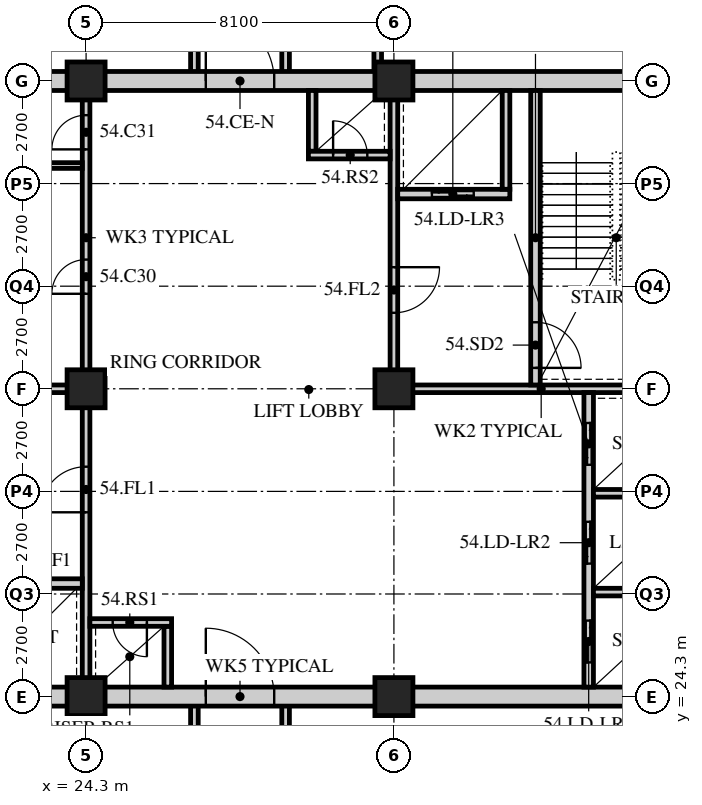
"""IFC4 building model, lengths in metres.
Left out: names, types, materials, properties, quantities, classifications, styles, units other than length and angle.
Written with IfcOpenShell. Run it as: python <this file> out.ifc"""

import sys

from ifc_helpers import new_model, si_unit, direction, frame, frame_2d, origin, origin_2d, place, context, subcontext, project, spatial, rectangle, hollow_rectangle, extrude, element, fill, save


model = new_model("IFC4")
c1 = context("Model", 3, precision=1e-05, world=origin(), true_north=direction((0.0, 1.0)))
c2 = subcontext(c1, "Body", "Model", "MODEL_VIEW")
j1 = project(units=[si_unit("LENGTHUNIT", "METRE"), si_unit("PLANEANGLEUNIT", "RADIAN")], contexts=[c1])
p1 = place(None, origin())
s1 = spatial("IfcSite", under=j1, at=p1, CompositionType="ELEMENT")
p2 = place(p1, origin())
s2 = spatial("IfcBuilding", under=s1, at=p2, CompositionType="ELEMENT")
p3 = place(p2, frame((0.0, 0.0, 210.0)))
s3 = spatial("IfcBuildingStorey", under=s2, at=p3, CompositionType="ELEMENT", Elevation=210.0)
for number, where, z_axis, x_axis in (
    (1, (24.3, 24.3, 0.0), (0.0, 0.0, 1.0), (1.0, 0.0, 0.0)),
    (2, (24.3, 32.4, 0.0), (0.0, 0.0, 1.0), (1.0, 0.0, 0.0)),
    (3, (24.3, 40.5, 0.0), (0.0, 0.0, 1.0), (1.0, 0.0, 0.0)),
    (4, (32.4, 24.3, 0.0), (0.0, 0.0, 1.0), (1.0, 0.0, 0.0)),
    (5, (32.4, 32.4, 0.0), (0.0, 0.0, 1.0), (1.0, 0.0, 0.0)),
    (6, (32.4, 40.5, 0.0), (0.0, 0.0, 1.0), (1.0, 0.0, 0.0)),
):
    element("IfcColumn", number, at=place(p3, frame(where, z_axis=z_axis, x_axis=x_axis)), inside=s3, PredefinedType="COLUMN", context=c2, shape_type="SweptSolid", body=[
        extrude(hollow_rectangle(XDim=1.0, YDim=1.0, WallThickness=0.1, at=origin_2d()), origin(), (0.0, 0.0, 1.0), 3.6),
    ])
for number, where, z_axis, x_axis in (
    (7, (27.15, 20.7, 0.0), (0.0, 0.0, 1.0), (0.0, 1.0, 0.0)),
    (8, (29.55, 20.7, 0.0), (0.0, 0.0, 1.0), (0.0, 1.0, 0.0)),
):
    element("IfcWall", number, at=place(p3, frame(where, z_axis=z_axis, x_axis=x_axis)), inside=s3, PredefinedType="SOLIDWALL", context=c2, shape_type="SweptSolid", body=[
        extrude(rectangle(XDim=3.6, YDim=0.2, at=frame_2d((1.8, 0.0))), origin(), (0.0, 0.0, 1.0), 3.39),
    ])
p4 = place(p3, frame((31.974, 45.45, 0.0), z_axis=(0.0, 0.0, 1.0), x_axis=(0.0, -1.0, 0.0)))
e9 = element("IfcWall", 9, at=p4, inside=s3, PredefinedType="SOLIDWALL", context=c2, shape_type="SweptSolid", body=[
    extrude(rectangle(XDim=4.95, YDim=0.2, at=frame_2d((2.475, 0.0))), origin(), (0.0, 0.0, 1.0), 2.69),
])
for number, where, z_axis, x_axis in (
    (10, (27.15, 40.5, 0.0), (0.0, 0.0, 1.0), (0.0, 1.0, 0.0)),
    (11, (29.55, 40.5, 0.0), (0.0, 0.0, 1.0), (0.0, 1.0, 0.0)),
):
    element("IfcWall", number, at=place(p3, frame(where, z_axis=z_axis, x_axis=x_axis)), inside=s3, PredefinedType="SOLIDWALL", context=c2, shape_type="SweptSolid", body=[
        extrude(rectangle(XDim=4.95, YDim=0.2, at=frame_2d((2.475, 0.0))), origin(), (0.0, 0.0, 1.0), 3.39),
    ])
p5 = place(p3, frame((15.95, 24.3, 0.0), z_axis=(0.0, 0.0, 1.0), x_axis=(1.0, 0.0, 0.0)))
e12 = element("IfcWall", 12, at=p5, inside=s3, PredefinedType="SOLIDWALL", context=c2, shape_type="SweptSolid", body=[
    extrude(rectangle(XDim=24.8, YDim=0.5, at=frame_2d((12.4, 0.0))), origin(), (0.0, 0.0, 1.0), 2.74),
])
p6 = place(p5, frame((11.5, 0.0, 0.0)))
e13 = element("IfcOpeningElement", 13, at=p6, cuts=e12, PredefinedType="OPENING", context=c2, shape_type="SweptSolid", body=[
    extrude(rectangle(XDim=1.8, YDim=2.4, at=frame_2d((0.9, 1.2))), frame((0.0, 0.26, 0.0), z_axis=(0.0, -1.0, 0.0), x_axis=(1.0, 0.0, 0.0)), (0.0, 0.0, 1.0), 0.52),
])
p7 = place(p3, frame((15.95, 40.5, 0.0), z_axis=(0.0, 0.0, 1.0), x_axis=(1.0, 0.0, 0.0)))
e14 = element("IfcWall", 14, at=p7, inside=s3, PredefinedType="SOLIDWALL", context=c2, shape_type="SweptSolid", body=[
    extrude(rectangle(XDim=24.8, YDim=0.5, at=frame_2d((12.4, 0.0))), origin(), (0.0, 0.0, 1.0), 2.74),
])
p8 = place(p7, frame((11.5, 0.0, 0.0)))
e15 = element("IfcOpeningElement", 15, at=p8, cuts=e14, PredefinedType="OPENING", context=c2, shape_type="SweptSolid", body=[
    extrude(rectangle(XDim=1.8, YDim=2.4, at=frame_2d((0.9, 1.2))), frame((0.0, 0.26, 0.0), z_axis=(0.0, -1.0, 0.0), x_axis=(1.0, 0.0, 0.0)), (0.0, 0.0, 1.0), 0.52),
])
p9 = place(p3, frame((16.45, 32.4, 0.0), z_axis=(0.0, 0.0, 1.0), x_axis=(1.0, 0.0, 0.0)))
e16 = element("IfcWall", 16, at=p9, inside=s3, PredefinedType="SOLIDWALL", context=c2, shape_type="SweptSolid", body=[
    extrude(rectangle(XDim=7.95, YDim=0.2, at=frame_2d((3.975, 0.0))), origin(), (0.0, 0.0, 1.0), 2.778),
])
p10 = place(p3, frame((24.3, 24.55, 0.0), z_axis=(0.0, 0.0, 1.0), x_axis=(0.0, 1.0, 0.0)))
e17 = element("IfcWall", 17, at=p10, inside=s3, PredefinedType="SOLIDWALL", context=c2, shape_type="SweptSolid", body=[
    extrude(rectangle(XDim=7.75, YDim=0.2, at=frame_2d((3.875, 0.0))), origin(), (0.0, 0.0, 1.0), 2.778),
])
p11 = place(p10, frame((4.6, 0.0, 0.0)))
e18 = element("IfcOpeningElement", 18, at=p11, cuts=e17, PredefinedType="OPENING", context=c2, shape_type="SweptSolid", body=[
    extrude(rectangle(XDim=1.2, YDim=2.1, at=frame_2d((0.6, 1.05))), frame((0.0, 0.11, 0.0), z_axis=(0.0, -1.0, 0.0), x_axis=(1.0, 0.0, 0.0)), (0.0, 0.0, 1.0), 0.22),
])
p12 = place(p3, frame((21.25, 27.275, 0.0), z_axis=(0.0, 0.0, 1.0), x_axis=(1.0, 0.0, 0.0)))
e19 = element("IfcWall", 19, at=p12, inside=s3, PredefinedType="SOLIDWALL", context=c2, shape_type="SweptSolid", body=[
    extrude(rectangle(XDim=2.95, YDim=0.25, at=frame_2d((1.475, 0.0))), origin(), (0.0, 0.0, 1.0), 3.39),
])
p13 = place(p12, frame((0.95, 0.0, 0.0)))
e20 = element("IfcOpeningElement", 20, at=p13, cuts=e19, PredefinedType="OPENING", context=c2, shape_type="SweptSolid", body=[
    extrude(rectangle(XDim=1.1, YDim=2.4, at=frame_2d((0.55, 1.2))), frame((0.0, 0.135, 0.0), z_axis=(0.0, -1.0, 0.0), x_axis=(1.0, 0.0, 0.0)), (0.0, 0.0, 1.0), 0.27),
])
p14 = place(p3, frame((26.45, 24.55, 0.0), z_axis=(0.0, 0.0, 1.0), x_axis=(0.0, 1.0, 0.0)))
e21 = element("IfcWall", 21, at=p14, inside=s3, PredefinedType="SOLIDWALL", context=c2, shape_type="SweptSolid", body=[
    extrude(rectangle(XDim=1.6, YDim=0.2, at=frame_2d((0.8, 0.0))), origin(), (0.0, 0.0, 1.0), 3.39),
])
p15 = place(p3, frame((24.4, 26.25, 0.0), z_axis=(0.0, 0.0, 1.0), x_axis=(1.0, 0.0, 0.0)))
e22 = element("IfcWall", 22, at=p15, inside=s3, PredefinedType="SOLIDWALL", context=c2, shape_type="SweptSolid", body=[
    extrude(rectangle(XDim=2.15, YDim=0.2, at=frame_2d((1.075, 0.0))), origin(), (0.0, 0.0, 1.0), 3.39),
])
p16 = place(p15, frame((0.6, 0.0, 0.0)))
e23 = element("IfcOpeningElement", 23, at=p16, cuts=e22, PredefinedType="OPENING", context=c2, shape_type="SweptSolid", body=[
    extrude(rectangle(XDim=0.9, YDim=2.1, at=frame_2d((0.45, 1.05))), frame((0.0, 0.11, 0.0), z_axis=(0.0, -1.0, 0.0), x_axis=(1.0, 0.0, 0.0)), (0.0, 0.0, 1.0), 0.22),
])
p17 = place(p3, frame((32.3, 32.4, 0.0), z_axis=(0.0, 0.0, 1.0), x_axis=(1.0, 0.0, 0.0)))
e24 = element("IfcWall", 24, at=p17, inside=s3, PredefinedType="SOLIDWALL", context=c2, shape_type="SweptSolid", body=[
    extrude(rectangle(XDim=7.95, YDim=0.2, at=frame_2d((3.975, 0.0))), origin(), (0.0, 0.0, 1.0), 2.778),
])
p18 = place(p3, frame((32.4, 32.5, 0.0), z_axis=(0.0, 0.0, 1.0), x_axis=(0.0, 1.0, 0.0)))
e25 = element("IfcWall", 25, at=p18, inside=s3, PredefinedType="SOLIDWALL", context=c2, shape_type="SweptSolid", body=[
    extrude(rectangle(XDim=7.75, YDim=0.2, at=frame_2d((3.875, 0.0))), origin(), (0.0, 0.0, 1.0), 2.778),
])
p19 = place(p18, frame((1.9, 0.0, 0.0)))
e26 = element("IfcOpeningElement", 26, at=p19, cuts=e25, PredefinedType="OPENING", context=c2, shape_type="SweptSolid", body=[
    extrude(rectangle(XDim=1.2, YDim=2.1, at=frame_2d((0.6, 1.05))), frame((0.0, 0.11, 0.0), z_axis=(0.0, -1.0, 0.0), x_axis=(1.0, 0.0, 0.0)), (0.0, 0.0, 1.0), 0.22),
])
p20 = place(p3, frame((37.525, 24.55, 0.0), z_axis=(0.0, 0.0, 1.0), x_axis=(0.0, 1.0, 0.0)))
e27 = element("IfcWall", 27, at=p20, inside=s3, PredefinedType="SOLIDWALL", context=c2, shape_type="SweptSolid", body=[
    extrude(rectangle(XDim=7.75, YDim=0.25, at=frame_2d((3.875, 0.0))), origin(), (0.0, 0.0, 1.0), 3.39),
])
p21 = place(p20, frame((0.65, 0.0, 0.0)))
e28 = element("IfcOpeningElement", 28, at=p21, cuts=e27, PredefinedType="OPENING", context=c2, shape_type="SweptSolid", body=[
    extrude(rectangle(XDim=1.1, YDim=2.4, at=frame_2d((0.55, 1.2))), frame((0.0, 0.135, 0.0), z_axis=(0.0, -1.0, 0.0), x_axis=(1.0, 0.0, 0.0)), (0.0, 0.0, 1.0), 0.27),
])
p22 = place(p20, frame((3.25, 0.0, 0.0)))
e29 = element("IfcOpeningElement", 29, at=p22, cuts=e27, PredefinedType="OPENING", context=c2, shape_type="SweptSolid", body=[
    extrude(rectangle(XDim=1.1, YDim=2.4, at=frame_2d((0.55, 1.2))), frame((0.0, 0.135, 0.0), z_axis=(0.0, -1.0, 0.0), x_axis=(1.0, 0.0, 0.0)), (0.0, 0.0, 1.0), 0.27),
])
p23 = place(p20, frame((5.85, 0.0, 0.0)))
e30 = element("IfcOpeningElement", 30, at=p23, cuts=e27, PredefinedType="OPENING", context=c2, shape_type="SweptSolid", body=[
    extrude(rectangle(XDim=1.1, YDim=2.4, at=frame_2d((0.55, 1.2))), frame((0.0, 0.135, 0.0), z_axis=(0.0, -1.0, 0.0), x_axis=(1.0, 0.0, 0.0)), (0.0, 0.0, 1.0), 0.27),
])
for number, where, z_axis, x_axis in (
    (31, (37.65, 27.05, 0.0), (0.0, 0.0, 1.0), (1.0, 0.0, 0.0)),
    (32, (37.65, 29.65, 0.0), (0.0, 0.0, 1.0), (1.0, 0.0, 0.0)),
):
    element("IfcWall", number, at=place(p3, frame(where, z_axis=z_axis, x_axis=x_axis)), inside=s3, PredefinedType="SOLIDWALL", context=c2, shape_type="SweptSolid", body=[
        extrude(rectangle(XDim=2.6, YDim=0.2, at=frame_2d((1.3, 0.0))), origin(), (0.0, 0.0, 1.0), 3.39),
    ])
p24 = place(p3, frame((36.125, 32.5, 0.0), z_axis=(0.0, 0.0, 1.0), x_axis=(0.0, 1.0, 0.0)))
e33 = element("IfcWall", 33, at=p24, inside=s3, PredefinedType="SOLIDWALL", context=c2, shape_type="SweptSolid", body=[
    extrude(rectangle(XDim=7.75, YDim=0.25, at=frame_2d((3.875, 0.0))), origin(), (0.0, 0.0, 1.0), 3.39),
])
p25 = place(p24, frame((0.45, 0.0, 0.0)))
e34 = element("IfcOpeningElement", 34, at=p25, cuts=e33, PredefinedType="OPENING", context=c2, shape_type="SweptSolid", body=[
    extrude(rectangle(XDim=1.2, YDim=2.1, at=frame_2d((0.6, 1.05))), frame((0.0, 0.135, 0.0), z_axis=(0.0, -1.0, 0.0), x_axis=(1.0, 0.0, 0.0)), (0.0, 0.0, 1.0), 0.27),
])
p26 = place(p3, frame((32.5, 37.525, 0.0), z_axis=(0.0, 0.0, 1.0), x_axis=(1.0, 0.0, 0.0)))
e35 = element("IfcWall", 35, at=p26, inside=s3, PredefinedType="SOLIDWALL", context=c2, shape_type="SweptSolid", body=[
    extrude(rectangle(XDim=2.95, YDim=0.25, at=frame_2d((1.475, 0.0))), origin(), (0.0, 0.0, 1.0), 3.39),
])
p27 = place(p26, frame((0.9, 0.0, 0.0)))
e36 = element("IfcOpeningElement", 36, at=p27, cuts=e35, PredefinedType="OPENING", context=c2, shape_type="SweptSolid", body=[
    extrude(rectangle(XDim=1.1, YDim=2.4, at=frame_2d((0.55, 1.2))), frame((0.0, 0.135, 0.0), z_axis=(0.0, -1.0, 0.0), x_axis=(1.0, 0.0, 0.0)), (0.0, 0.0, 1.0), 0.27),
])
p28 = place(p3, frame((35.35, 37.65, 0.0), z_axis=(0.0, 0.0, 1.0), x_axis=(0.0, 1.0, 0.0)))
e37 = element("IfcWall", 37, at=p28, inside=s3, PredefinedType="SOLIDWALL", context=c2, shape_type="SweptSolid", body=[
    extrude(rectangle(XDim=2.6, YDim=0.2, at=frame_2d((1.3, 0.0))), origin(), (0.0, 0.0, 1.0), 3.39),
])
p29 = place(p3, frame((30.25, 38.65, 0.0), z_axis=(0.0, 0.0, 1.0), x_axis=(0.0, 1.0, 0.0)))
e38 = element("IfcWall", 38, at=p29, inside=s3, PredefinedType="SOLIDWALL", context=c2, shape_type="SweptSolid", body=[
    extrude(rectangle(XDim=1.6, YDim=0.2, at=frame_2d((0.8, 0.0))), origin(), (0.0, 0.0, 1.0), 3.39),
])
p30 = place(p3, frame((30.15, 38.55, 0.0), z_axis=(0.0, 0.0, 1.0), x_axis=(1.0, 0.0, 0.0)))
e39 = element("IfcWall", 39, at=p30, inside=s3, PredefinedType="SOLIDWALL", context=c2, shape_type="SweptSolid", body=[
    extrude(rectangle(XDim=2.15, YDim=0.2, at=frame_2d((1.075, 0.0))), origin(), (0.0, 0.0, 1.0), 3.39),
])
p31 = place(p30, frame((0.65, 0.0, 0.0)))
e40 = element("IfcOpeningElement", 40, at=p31, cuts=e39, PredefinedType="OPENING", context=c2, shape_type="SweptSolid", body=[
    extrude(rectangle(XDim=0.9, YDim=2.1, at=frame_2d((0.45, 1.05))), frame((0.0, 0.11, 0.0), z_axis=(0.0, -1.0, 0.0), x_axis=(1.0, 0.0, 0.0)), (0.0, 0.0, 1.0), 0.22),
])
p32 = place(p3, frame((24.3, 32.5, 0.0), z_axis=(0.0, 0.0, 1.0), x_axis=(0.0, 1.0, 0.0)))
e41 = element("IfcWall", 41, at=p32, inside=s3, PredefinedType="PARTITIONING", context=c2, shape_type="SweptSolid", body=[
    extrude(rectangle(XDim=7.75, YDim=0.2, at=frame_2d((3.875, 0.0))), origin(), (0.0, 0.0, 1.0), 2.778),
])
p33 = place(p32, frame((2.4, 0.0, 0.0)))
e42 = element("IfcOpeningElement", 42, at=p33, cuts=e41, PredefinedType="OPENING", context=c2, shape_type="SweptSolid", body=[
    extrude(rectangle(XDim=0.9, YDim=2.1, at=frame_2d((0.45, 1.05))), frame((0.0, 0.11, 0.0), z_axis=(0.0, -1.0, 0.0), x_axis=(1.0, 0.0, 0.0)), (0.0, 0.0, 1.0), 0.22),
])
p34 = place(p32, frame((6.2, 0.0, 0.0)))
e43 = element("IfcOpeningElement", 43, at=p34, cuts=e41, PredefinedType="OPENING", context=c2, shape_type="SweptSolid", body=[
    extrude(rectangle(XDim=0.9, YDim=2.1, at=frame_2d((0.45, 1.05))), frame((0.0, 0.11, 0.0), z_axis=(0.0, -1.0, 0.0), x_axis=(1.0, 0.0, 0.0)), (0.0, 0.0, 1.0), 0.22),
])
p35 = place(p3, frame((16.45, 38.275, 0.0), z_axis=(0.0, 0.0, 1.0), x_axis=(1.0, 0.0, 0.0)))
e44 = element("IfcWall", 44, at=p35, inside=s3, PredefinedType="PARTITIONING", context=c2, shape_type="SweptSolid", body=[
    extrude(rectangle(XDim=7.75, YDim=0.15, at=frame_2d((3.875, 0.0))), origin(), (0.0, 0.0, 1.0), 3.39),
])
p36 = place(p33, origin())
e45 = element("IfcDoor", 45, at=p36, inside=s3, OperationType="SINGLE_SWING_LEFT", PredefinedType="DOOR", context=c2, shape_type="SweptSolid", body=[
    extrude(rectangle(XDim=0.9, YDim=2.1, at=frame_2d((0.45, 1.05))), frame((0.0, 0.025, 0.0), z_axis=(0.0, -1.0, 0.0), x_axis=(1.0, 0.0, 0.0)), (0.0, 0.0, 1.0), 0.05),
])
fill(e42, e45)
p37 = place(p34, origin())
e46 = element("IfcDoor", 46, at=p37, inside=s3, OperationType="SINGLE_SWING_LEFT", PredefinedType="DOOR", context=c2, shape_type="SweptSolid", body=[
    extrude(rectangle(XDim=0.9, YDim=2.1, at=frame_2d((0.45, 1.05))), frame((0.0, 0.025, 0.0), z_axis=(0.0, -1.0, 0.0), x_axis=(1.0, 0.0, 0.0)), (0.0, 0.0, 1.0), 0.05),
])
fill(e43, e46)
p38 = place(p11, origin())
e47 = element("IfcDoor", 47, at=p38, inside=s3, OperationType="SINGLE_SWING_LEFT", PredefinedType="DOOR", context=c2, shape_type="SweptSolid", body=[
    extrude(rectangle(XDim=1.2, YDim=2.1, at=frame_2d((0.6, 1.05))), frame((0.0, 0.025, 0.0), z_axis=(0.0, -1.0, 0.0), x_axis=(1.0, 0.0, 0.0)), (0.0, 0.0, 1.0), 0.05),
])
fill(e18, e47)
p39 = place(p16, origin())
e48 = element("IfcDoor", 48, at=p39, inside=s3, OperationType="SINGLE_SWING_LEFT", PredefinedType="DOOR", context=c2, shape_type="SweptSolid", body=[
    extrude(rectangle(XDim=0.9, YDim=2.1, at=frame_2d((0.45, 1.05))), frame((0.0, 0.025, 0.0), z_axis=(0.0, -1.0, 0.0), x_axis=(1.0, 0.0, 0.0)), (0.0, 0.0, 1.0), 0.05),
])
fill(e23, e48)
p40 = place(p25, origin())
e49 = element("IfcDoor", 49, at=p40, inside=s3, OperationType="SINGLE_SWING_RIGHT", PredefinedType="DOOR", context=c2, shape_type="SweptSolid", body=[
    extrude(rectangle(XDim=1.2, YDim=2.1, at=frame_2d((0.6, 1.05))), frame((0.0, 0.025, 0.0), z_axis=(0.0, -1.0, 0.0), x_axis=(1.0, 0.0, 0.0)), (0.0, 0.0, 1.0), 0.05),
])
fill(e34, e49)
p41 = place(p19, origin())
e50 = element("IfcDoor", 50, at=p41, inside=s3, OperationType="SINGLE_SWING_LEFT", PredefinedType="DOOR", context=c2, shape_type="SweptSolid", body=[
    extrude(rectangle(XDim=1.2, YDim=2.1, at=frame_2d((0.6, 1.05))), frame((0.0, 0.025, 0.0), z_axis=(0.0, -1.0, 0.0), x_axis=(1.0, 0.0, 0.0)), (0.0, 0.0, 1.0), 0.05),
])
fill(e26, e50)
p42 = place(p31, origin())
e51 = element("IfcDoor", 51, at=p42, inside=s3, OperationType="SINGLE_SWING_LEFT", PredefinedType="DOOR", context=c2, shape_type="SweptSolid", body=[
    extrude(rectangle(XDim=0.9, YDim=2.1, at=frame_2d((0.45, 1.05))), frame((0.0, 0.025, 0.0), z_axis=(0.0, -1.0, 0.0), x_axis=(1.0, 0.0, 0.0)), (0.0, 0.0, 1.0), 0.05),
])
fill(e40, e51)
p43 = place(p21, origin())
e52 = element("IfcDoor", 52, at=p43, inside=s3, OperationType="DOUBLE_DOOR_SLIDING", PredefinedType="DOOR", context=c2, shape_type="SweptSolid", body=[
    extrude(rectangle(XDim=1.1, YDim=2.4, at=frame_2d((0.55, 1.2))), frame((0.0, 0.025, 0.0), z_axis=(0.0, -1.0, 0.0), x_axis=(1.0, 0.0, 0.0)), (0.0, 0.0, 1.0), 0.05),
])
fill(e28, e52)
p44 = place(p22, origin())
e53 = element("IfcDoor", 53, at=p44, inside=s3, OperationType="DOUBLE_DOOR_SLIDING", PredefinedType="DOOR", context=c2, shape_type="SweptSolid", body=[
    extrude(rectangle(XDim=1.1, YDim=2.4, at=frame_2d((0.55, 1.2))), frame((0.0, 0.025, 0.0), z_axis=(0.0, -1.0, 0.0), x_axis=(1.0, 0.0, 0.0)), (0.0, 0.0, 1.0), 0.05),
])
fill(e29, e53)
p45 = place(p23, origin())
e54 = element("IfcDoor", 54, at=p45, inside=s3, OperationType="DOUBLE_DOOR_SLIDING", PredefinedType="DOOR", context=c2, shape_type="SweptSolid", body=[
    extrude(rectangle(XDim=1.1, YDim=2.4, at=frame_2d((0.55, 1.2))), frame((0.0, 0.025, 0.0), z_axis=(0.0, -1.0, 0.0), x_axis=(1.0, 0.0, 0.0)), (0.0, 0.0, 1.0), 0.05),
])
fill(e30, e54)
p46 = place(p27, origin())
e55 = element("IfcDoor", 55, at=p46, inside=s3, OperationType="DOUBLE_DOOR_SLIDING", PredefinedType="DOOR", context=c2, shape_type="SweptSolid", body=[
    extrude(rectangle(XDim=1.1, YDim=2.4, at=frame_2d((0.55, 1.2))), frame((0.0, 0.025, 0.0), z_axis=(0.0, -1.0, 0.0), x_axis=(1.0, 0.0, 0.0)), (0.0, 0.0, 1.0), 0.05),
])
fill(e36, e55)
p47 = place(p6, origin())
e56 = element("IfcDoor", 56, at=p47, inside=s3, OperationType="DOUBLE_DOOR_SINGLE_SWING", PredefinedType="DOOR", context=c2, shape_type="SweptSolid", body=[
    extrude(rectangle(XDim=1.8, YDim=2.4, at=frame_2d((0.9, 1.2))), frame((0.0, 0.025, 0.0), z_axis=(0.0, -1.0, 0.0), x_axis=(1.0, 0.0, 0.0)), (0.0, 0.0, 1.0), 0.05),
])
fill(e13, e56)
p48 = place(p8, origin())
e57 = element("IfcDoor", 57, at=p48, inside=s3, OperationType="DOUBLE_DOOR_SINGLE_SWING", PredefinedType="DOOR", context=c2, shape_type="SweptSolid", body=[
    extrude(rectangle(XDim=1.8, YDim=2.4, at=frame_2d((0.9, 1.2))), frame((0.0, 0.025, 0.0), z_axis=(0.0, -1.0, 0.0), x_axis=(1.0, 0.0, 0.0)), (0.0, 0.0, 1.0), 0.05),
])
fill(e15, e57)
save(model, sys.argv[1])
